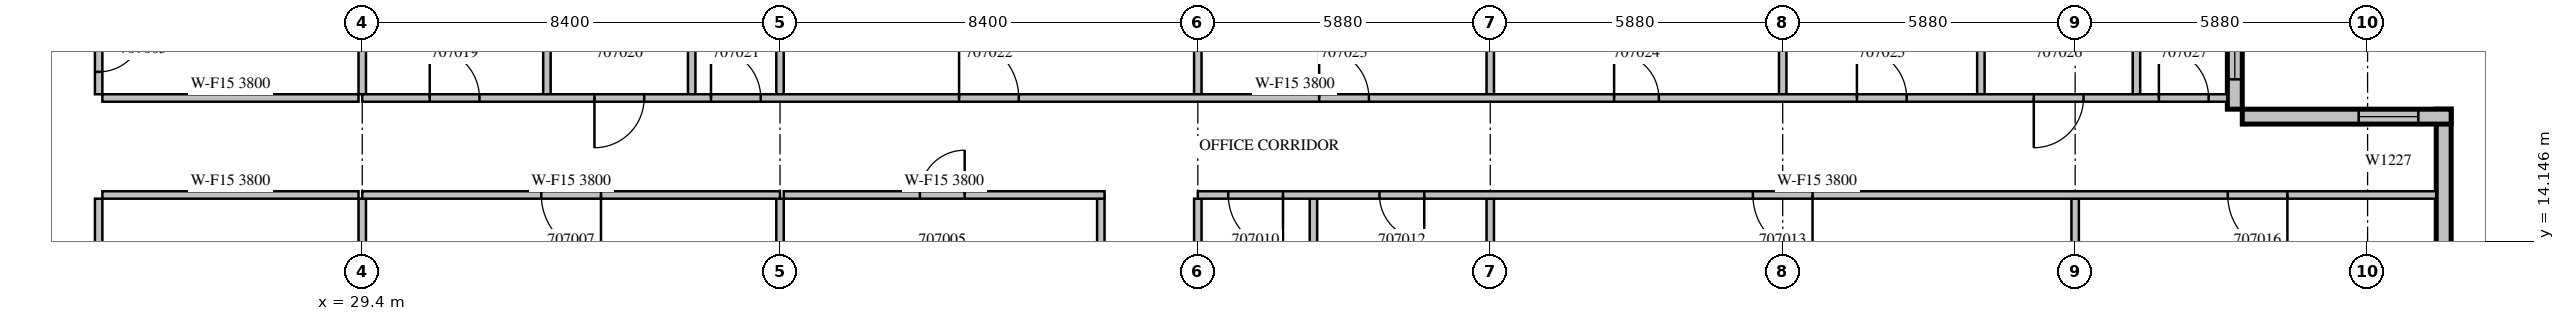
"""IFC4 building model, lengths in metres.
Left out: names, types, materials, properties, quantities, classifications, styles, units other than length and angle.
Written with IfcOpenShell. Run it as: python <this file> out.ifc"""

import sys

from ifc_helpers import new_model, si_unit, direction, frame, frame_2d, origin, place, context, subcontext, project, spatial, rectangle, extrude, source, transform, mapped, element, fill, save


model = new_model("IFC4")
c1 = context("Model", 3, precision=1e-05, world=origin(), true_north=direction((0.0, 1.0)))
c2 = subcontext(c1, "Body", "Model", "MODEL_VIEW")
j1 = project(units=[si_unit("LENGTHUNIT", "METRE"), si_unit("PLANEANGLEUNIT", "RADIAN")], contexts=[c1])
p1 = place(None, origin())
s1 = spatial("IfcSite", under=j1, at=p1, CompositionType="ELEMENT")
p2 = place(p1, origin())
s2 = spatial("IfcBuilding", under=s1, at=p2, CompositionType="ELEMENT")
p3 = place(p2, frame((0.0, 0.0, 40.5)))
s3 = spatial("IfcBuildingStorey", under=s2, at=p3, CompositionType="ELEMENT", Elevation=40.5)
p4 = place(p3, frame((71.25, 10.5, 0.0), z_axis=(0.0, 0.0, 1.0), x_axis=(0.0, 1.0, 0.0)))
e1 = element("IfcWall", 1, at=p4, inside=s3, PredefinedType="STANDARD", context=c2, shape_type="SweptSolid", body=[
    extrude(rectangle(XDim=6.3, YDim=0.3, at=frame_2d((3.15, 0.0))), origin(), (0.0, 0.0, 1.0), 3.8),
])
m1 = source(origin(), c2, "Body", "SweptSolid", [
    extrude(rectangle(XDim=1.2, YDim=2.7, at=frame_2d((0.6, 1.35))), frame((0.0, 0.16, 0.0), z_axis=(0.0, -1.0, 0.0), x_axis=(1.0, 0.0, 0.0)), (0.0, 0.0, 1.0), 0.32),
])
p5 = place(p4, frame((1.062, 0.0, 0.6)))
e2 = element("IfcOpeningElement", 2, at=p5, cuts=e1, PredefinedType="OPENING", context=c2, shape_type="MappedRepresentation", body=[
    mapped(m1, transform((0.0, 0.0, 0.0), scale=1.0)),
])
m2 = source(origin(), c2, "Body", "SweptSolid", [
    extrude(rectangle(XDim=4.2, YDim=0.3, at=frame_2d((2.1, 0.0))), origin(), (0.0, 0.0, 1.0), 3.8),
])
p6 = place(p3, frame((71.4, 16.65, 0.0), z_axis=(0.0, 0.0, 1.0), x_axis=(-1.0, 0.0, 0.0)))
e3 = element("IfcWall", 3, at=p6, inside=s3, PredefinedType="STANDARD", context=c2, shape_type="MappedRepresentation", body=[
    mapped(m2, transform((0.0, 0.0, 0.0), scale=1.0)),
])
p7 = place(p6, frame((0.66, 0.0, 0.6)))
e4 = element("IfcOpeningElement", 4, at=p7, cuts=e3, PredefinedType="OPENING", context=c2, shape_type="MappedRepresentation", body=[
    mapped(m1, transform((0.0, 0.0, 0.0), scale=1.0)),
])
p8 = place(p3, frame((67.05, 16.8, 0.0), z_axis=(0.0, 0.0, 1.0), x_axis=(0.0, 1.0, 0.0)))
e5 = element("IfcWall", 5, at=p8, inside=s3, PredefinedType="STANDARD", context=c2, shape_type="MappedRepresentation", body=[
    mapped(m2, transform((0.0, 0.0, 0.0), scale=1.0)),
])
m3 = source(origin(), c2, "Body", "SweptSolid", [
    extrude(rectangle(XDim=3.0, YDim=2.7, at=frame_2d((1.5, 1.35))), frame((0.0, 0.16, 0.0), z_axis=(0.0, -1.0, 0.0), x_axis=(1.0, 0.0, 0.0)), (0.0, 0.0, 1.0), 0.32),
])
p9 = place(p8, frame((0.6, 0.0, 0.6)))
e6 = element("IfcOpeningElement", 6, at=p9, cuts=e5, PredefinedType="OPENING", context=c2, shape_type="MappedRepresentation", body=[
    mapped(m3, transform((0.0, 0.0, 0.0), scale=1.0)),
])
p10 = place(p3, frame((24.1, 15.0, 0.0), z_axis=(0.0, 0.0, 1.0), x_axis=(0.0, -1.0, 0.0)))
e7 = element("IfcWall", 7, at=p10, inside=s3, PredefinedType="PARTITIONING", context=c2, shape_type="SweptSolid", body=[
    extrude(rectangle(XDim=11.925, YDim=0.15, at=frame_2d((5.963, 0.0))), origin(), (0.0, 0.0, 1.0), 3.8),
])
p11 = place(p10, frame((9.562, 0.0, 0.0)))
e8 = element("IfcOpeningElement", 8, at=p11, cuts=e7, PredefinedType="OPENING", context=c2, shape_type="SweptSolid", body=[
    extrude(rectangle(XDim=0.9, YDim=2.1, at=frame_2d((0.45, 1.05))), frame((0.0, 0.085, 0.0), z_axis=(0.0, -1.0, 0.0), x_axis=(1.0, 0.0, 0.0)), (0.0, 0.0, 1.0), 0.17),
])
m4 = source(origin(), c2, "Body", "SweptSolid", [
    extrude(rectangle(XDim=0.9, YDim=2.1, at=frame_2d((0.45, 1.05))), frame((0.0, 0.085, 0.0), z_axis=(0.0, -1.0, 0.0), x_axis=(1.0, 0.0, 0.0)), (0.0, 0.0, 1.0), 0.17),
])
p12 = place(p10, frame((2.725, 0.0, 0.0)))
e9 = element("IfcOpeningElement", 9, at=p12, cuts=e7, PredefinedType="OPENING", context=c2, shape_type="MappedRepresentation", body=[
    mapped(m4, transform((0.0, 0.0, 0.0), scale=1.0)),
])
p13 = place(p3, frame((24.1, 20.7, 0.0), z_axis=(0.0, 0.0, 1.0), x_axis=(0.0, -1.0, 0.0)))
e10 = element("IfcWall", 10, at=p13, inside=s3, PredefinedType="PARTITIONING", context=c2, shape_type="SweptSolid", body=[
    extrude(rectangle(XDim=3.6, YDim=0.15, at=frame_2d((1.8, 0.0))), origin(), (0.0, 0.0, 1.0), 3.8),
])
p14 = place(p13, frame((2.25, 0.0, 0.0)))
e11 = element("IfcOpeningElement", 11, at=p14, cuts=e10, PredefinedType="OPENING", context=c2, shape_type="MappedRepresentation", body=[
    mapped(m4, transform((0.0, 0.0, 0.0), scale=1.0)),
])
m5 = source(origin(), c2, "Body", "SweptSolid", [
    extrude(rectangle(XDim=5.15, YDim=0.15, at=frame_2d((2.575, 0.0))), origin(), (0.0, 0.0, 1.0), 3.8),
])
for number, where, z_axis, x_axis in (
    (12, (29.325, 15.075, 0.0), (0.0, 0.0, 1.0), (-1.0, 0.0, 0.0)),
    (13, (24.175, 17.025, 0.0), (0.0, 0.0, 1.0), (1.0, 0.0, 0.0)),
):
    element("IfcWall", number, at=place(p3, frame(where, z_axis=z_axis, x_axis=x_axis)), inside=s3, PredefinedType="PARTITIONING", context=c2, shape_type="MappedRepresentation", body=[
        mapped(m5, transform((0.0, 0.0, 0.0), scale=1.0)),
    ])
p15 = place(p3, frame((29.4, 11.099, 0.0), z_axis=(0.0, 0.0, 1.0), x_axis=(0.0, 1.0, 0.0)))
e14 = element("IfcWall", 14, at=p15, inside=s3, PredefinedType="PARTITIONING", context=c2, shape_type="SweptSolid", body=[
    extrude(rectangle(XDim=3.901, YDim=0.15, at=frame_2d((1.95, 0.0))), origin(), (0.0, 0.0, 1.0), 3.8),
])
p16 = place(p3, frame((29.4, 17.1, 0.0), z_axis=(0.0, 0.0, 1.0), x_axis=(0.0, 1.0, 0.0)))
e15 = element("IfcWall", 15, at=p16, inside=s3, PredefinedType="PARTITIONING", context=c2, shape_type="SweptSolid", body=[
    extrude(rectangle(XDim=2.701, YDim=0.15, at=frame_2d((1.351, 0.0))), origin(), (0.0, 0.0, 1.0), 3.8),
])
p17 = place(p3, frame((44.25, 11.1, 0.0), z_axis=(0.0, 0.0, 1.0), x_axis=(0.0, 1.0, 0.0)))
e16 = element("IfcWall", 16, at=p17, inside=s3, PredefinedType="PARTITIONING", context=c2, shape_type="SweptSolid", body=[
    extrude(rectangle(XDim=3.975, YDim=0.15, at=frame_2d((1.988, 0.0))), origin(), (0.0, 0.0, 1.0), 3.8),
])
m6 = source(origin(), c2, "Body", "SweptSolid", [
    extrude(rectangle(XDim=6.45, YDim=0.15, at=frame_2d((3.225, 0.0))), origin(), (0.0, 0.0, 1.0), 3.8),
])
p18 = place(p3, frame((44.325, 15.075, 0.0), z_axis=(0.0, 0.0, 1.0), x_axis=(-1.0, 0.0, 0.0)))
e17 = element("IfcWall", 17, at=p18, inside=s3, PredefinedType="PARTITIONING", context=c2, shape_type="MappedRepresentation", body=[
    mapped(m6, transform((0.0, 0.0, 0.0), scale=1.0)),
])
p19 = place(p18, frame((2.812, 0.0, 0.0)))
e18 = element("IfcOpeningElement", 18, at=p19, cuts=e17, PredefinedType="OPENING", context=c2, shape_type="MappedRepresentation", body=[
    mapped(m4, transform((0.0, 0.0, 0.0), scale=1.0)),
])
p20 = place(p3, frame((37.8, 11.25, 0.0), z_axis=(0.0, 0.0, 1.0), x_axis=(0.0, 1.0, 0.0)))
e19 = element("IfcWall", 19, at=p20, inside=s3, PredefinedType="PARTITIONING", context=c2, shape_type="SweptSolid", body=[
    extrude(rectangle(XDim=3.75, YDim=0.15, at=frame_2d((1.875, 0.0))), origin(), (0.0, 0.0, 1.0), 3.8),
])
m7 = source(origin(), c2, "Body", "SweptSolid", [
    extrude(rectangle(XDim=3.75, YDim=0.15, at=frame_2d((1.875, 0.0))), origin(), (0.0, 0.0, 1.0), 3.8),
])
for number, where, z_axis, x_axis in (
    (20, (48.525, 11.25, 0.0), (0.0, 0.0, 1.0), (0.0, 1.0, 0.0)),
    (21, (46.2, 11.25, 0.0), (0.0, 0.0, 1.0), (0.0, 1.0, 0.0)),
    (22, (52.08, 11.25, 0.0), (0.0, 0.0, 1.0), (0.0, 1.0, 0.0)),
    (23, (63.84, 11.25, 0.0), (0.0, 0.0, 1.0), (0.0, 1.0, 0.0)),
):
    element("IfcWall", number, at=place(p3, frame(where, z_axis=z_axis, x_axis=x_axis)), inside=s3, PredefinedType="PARTITIONING", context=c2, shape_type="MappedRepresentation", body=[
        mapped(m7, transform((0.0, 0.0, 0.0), scale=1.0)),
    ])
m8 = source(origin(), c2, "Body", "SweptSolid", [
    extrude(rectangle(XDim=3.6, YDim=0.15, at=frame_2d((1.8, 0.0))), origin(), (0.0, 0.0, 1.0), 3.8),
])
for number, where, z_axis, x_axis in (
    (24, (33.113, 20.7, 0.0), (0.0, 0.0, 1.0), (0.0, -1.0, 0.0)),
    (25, (36.024, 20.7, 0.0), (0.0, 0.0, 1.0), (0.0, -1.0, 0.0)),
    (26, (61.944, 20.7, 0.0), (0.0, 0.0, 1.0), (0.0, -1.0, 0.0)),
    (27, (65.072, 20.7, 0.0), (0.0, 0.0, 1.0), (0.0, -1.0, 0.0)),
):
    element("IfcWall", number, at=place(p3, frame(where, z_axis=z_axis, x_axis=x_axis)), inside=s3, PredefinedType="PARTITIONING", context=c2, shape_type="MappedRepresentation", body=[
        mapped(m8, transform((0.0, 0.0, 0.0), scale=1.0)),
    ])
m9 = source(origin(), c2, "Body", "SweptSolid", [
    extrude(rectangle(XDim=2.701, YDim=0.15, at=frame_2d((1.351, 0.0))), origin(), (0.0, 0.0, 1.0), 3.8),
])
for number, where, z_axis, x_axis in (
    (28, (37.8, 17.1, 0.0), (0.0, 0.0, 1.0), (0.0, 1.0, 0.0)),
    (29, (46.2, 17.1, 0.0), (0.0, 0.0, 1.0), (0.0, 1.0, 0.0)),
    (30, (52.08, 17.1, 0.0), (0.0, 0.0, 1.0), (0.0, 1.0, 0.0)),
    (31, (57.96, 17.1, 0.0), (0.0, 0.0, 1.0), (0.0, 1.0, 0.0)),
):
    element("IfcWall", number, at=place(p3, frame(where, z_axis=z_axis, x_axis=x_axis)), inside=s3, PredefinedType="PARTITIONING", context=c2, shape_type="MappedRepresentation", body=[
        mapped(m9, transform((0.0, 0.0, 0.0), scale=1.0)),
    ])
m10 = source(origin(), c2, "Body", "SweptSolid", [
    extrude(rectangle(XDim=8.4, YDim=0.15, at=frame_2d((4.2, 0.0))), origin(), (0.0, 0.0, 1.0), 3.8),
])
p21 = place(p3, frame((37.8, 15.075, 0.0), z_axis=(0.0, 0.0, 1.0), x_axis=(-1.0, 0.0, 0.0)))
e32 = element("IfcWall", 32, at=p21, inside=s3, PredefinedType="PARTITIONING", context=c2, shape_type="MappedRepresentation", body=[
    mapped(m10, transform((0.0, 0.0, 0.0), scale=1.0)),
])
p22 = place(p21, frame((3.6, 0.0, 0.0)))
e33 = element("IfcOpeningElement", 33, at=p22, cuts=e32, PredefinedType="OPENING", context=c2, shape_type="SweptSolid", body=[
    extrude(rectangle(XDim=1.2, YDim=2.1, at=frame_2d((0.6, 1.05))), frame((0.0, 0.085, 0.0), z_axis=(0.0, -1.0, 0.0), x_axis=(1.0, 0.0, 0.0)), (0.0, 0.0, 1.0), 0.17),
])
m11 = source(origin(), c2, "Body", "SweptSolid", [
    extrude(rectangle(XDim=24.9, YDim=0.15, at=frame_2d((12.45, 0.0))), origin(), (0.0, 0.0, 1.0), 3.8),
])
p23 = place(p3, frame((71.1, 15.075, 0.0), z_axis=(0.0, 0.0, 1.0), x_axis=(-1.0, 0.0, 0.0)))
e34 = element("IfcWall", 34, at=p23, inside=s3, PredefinedType="PARTITIONING", context=c2, shape_type="MappedRepresentation", body=[
    mapped(m11, transform((0.0, 0.0, 0.0), scale=1.0)),
])
p24 = place(p23, frame((23.188, 0.0, 0.0)))
e35 = element("IfcOpeningElement", 35, at=p24, cuts=e34, PredefinedType="OPENING", context=c2, shape_type="SweptSolid", body=[
    extrude(rectangle(XDim=1.1, YDim=2.1, at=frame_2d((0.55, 1.05))), frame((0.0, 0.085, 0.0), z_axis=(0.0, -1.0, 0.0), x_axis=(1.0, 0.0, 0.0)), (0.0, 0.0, 1.0), 0.17),
])
p25 = place(p23, frame((20.348, 0.0, 0.0)))
e36 = element("IfcOpeningElement", 36, at=p25, cuts=e34, PredefinedType="OPENING", context=c2, shape_type="MappedRepresentation", body=[
    mapped(m4, transform((0.0, 0.0, 0.0), scale=1.0)),
])
m12 = source(origin(), c2, "Body", "SweptSolid", [
    extrude(rectangle(XDim=1.2, YDim=2.1, at=frame_2d((0.6, 1.05))), frame((0.0, 0.085, 0.0), z_axis=(0.0, -1.0, 0.0), x_axis=(1.0, 0.0, 0.0)), (0.0, 0.0, 1.0), 0.17),
])
p26 = place(p23, frame((12.54, 0.0, 0.0)))
e37 = element("IfcOpeningElement", 37, at=p26, cuts=e34, PredefinedType="OPENING", context=c2, shape_type="MappedRepresentation", body=[
    mapped(m12, transform((0.0, 0.0, 0.0), scale=1.0)),
])
p27 = place(p23, frame((2.993, 0.0, 0.0)))
e38 = element("IfcOpeningElement", 38, at=p27, cuts=e34, PredefinedType="OPENING", context=c2, shape_type="MappedRepresentation", body=[
    mapped(m12, transform((0.0, 0.0, 0.0), scale=1.0)),
])
p28 = place(p3, frame((29.4, 17.025, 0.0), z_axis=(0.0, 0.0, 1.0), x_axis=(1.0, 0.0, 0.0)))
e39 = element("IfcWall", 39, at=p28, inside=s3, PredefinedType="PARTITIONING", context=c2, shape_type="SweptSolid", body=[
    extrude(rectangle(XDim=37.5, YDim=0.15, at=frame_2d((18.75, 0.0))), origin(), (0.0, 0.0, 1.0), 3.8),
])
m13 = source(origin(), c2, "Body", "SweptSolid", [
    extrude(rectangle(XDim=1.0, YDim=2.1, at=frame_2d((0.5, 1.05))), frame((0.0, 0.085, 0.0), z_axis=(0.0, -1.0, 0.0), x_axis=(1.0, 0.0, 0.0)), (0.0, 0.0, 1.0), 0.17),
])
p29 = place(p28, frame((1.357, 0.0, 0.0)))
e40 = element("IfcOpeningElement", 40, at=p29, cuts=e39, PredefinedType="OPENING", context=c2, shape_type="MappedRepresentation", body=[
    mapped(m13, transform((0.0, 0.0, 0.0), scale=1.0)),
])
p30 = place(p28, frame((4.669, 0.0, 0.0)))
e41 = element("IfcOpeningElement", 41, at=p30, cuts=e39, PredefinedType="OPENING", context=c2, shape_type="MappedRepresentation", body=[
    mapped(m13, transform((0.0, 0.0, 0.0), scale=1.0)),
])
p31 = place(p28, frame((7.012, 0.0, 0.0)))
e42 = element("IfcOpeningElement", 42, at=p31, cuts=e39, PredefinedType="OPENING", context=c2, shape_type="MappedRepresentation", body=[
    mapped(m13, transform((0.0, 0.0, 0.0), scale=1.0)),
])
p32 = place(p28, frame((12.0, 0.0, 0.0)))
e43 = element("IfcOpeningElement", 43, at=p32, cuts=e39, PredefinedType="OPENING", context=c2, shape_type="MappedRepresentation", body=[
    mapped(m12, transform((0.0, 0.0, 0.0), scale=1.0)),
])
p33 = place(p28, frame((19.24, 0.0, 0.0)))
e44 = element("IfcOpeningElement", 44, at=p33, cuts=e39, PredefinedType="OPENING", context=c2, shape_type="MappedRepresentation", body=[
    mapped(m13, transform((0.0, 0.0, 0.0), scale=1.0)),
])
p34 = place(p28, frame((25.17, 0.0, 0.0)))
e45 = element("IfcOpeningElement", 45, at=p34, cuts=e39, PredefinedType="OPENING", context=c2, shape_type="MappedRepresentation", body=[
    mapped(m4, transform((0.0, 0.0, 0.0), scale=1.0)),
])
p35 = place(p28, frame((30.052, 0.0, 0.0)))
e46 = element("IfcOpeningElement", 46, at=p35, cuts=e39, PredefinedType="OPENING", context=c2, shape_type="MappedRepresentation", body=[
    mapped(m13, transform((0.0, 0.0, 0.0), scale=1.0)),
])
p36 = place(p28, frame((33.608, 0.0, 0.0)))
e47 = element("IfcOpeningElement", 47, at=p36, cuts=e39, PredefinedType="OPENING", context=c2, shape_type="MappedRepresentation", body=[
    mapped(m13, transform((0.0, 0.0, 0.0), scale=1.0)),
])
p37 = place(p28, frame((36.124, 0.0, 0.0)))
e48 = element("IfcOpeningElement", 48, at=p37, cuts=e39, PredefinedType="OPENING", context=c2, shape_type="MappedRepresentation", body=[
    mapped(m13, transform((0.0, 0.0, 0.0), scale=1.0)),
])
m14 = source(origin(), c2, "Body", "SweptSolid", [
    extrude(rectangle(XDim=1.2, YDim=2.7, at=frame_2d((0.6, 1.35))), frame((0.0, 0.03, 0.0), z_axis=(0.0, -1.0, 0.0), x_axis=(1.0, 0.0, 0.0)), (0.0, 0.0, 1.0), 0.06),
])
p38 = place(p7, origin())
e49 = element("IfcWindow", 49, at=p38, inside=s3, PartitioningType="SINGLE_PANEL", PredefinedType="WINDOW", context=c2, shape_type="MappedRepresentation", body=[
    mapped(m14, transform((0.0, 0.0, 0.0), scale=1.0)),
])
fill(e4, e49)
m15 = source(origin(), c2, "Body", "SweptSolid", [
    extrude(rectangle(XDim=3.0, YDim=2.7, at=frame_2d((1.5, 1.35))), frame((0.0, 0.03, 0.0), z_axis=(0.0, -1.0, 0.0), x_axis=(1.0, 0.0, 0.0)), (0.0, 0.0, 1.0), 0.06),
])
p39 = place(p9, origin())
e50 = element("IfcWindow", 50, at=p39, inside=s3, PartitioningType="SINGLE_PANEL", PredefinedType="WINDOW", context=c2, shape_type="MappedRepresentation", body=[
    mapped(m15, transform((0.0, 0.0, 0.0), scale=1.0)),
])
fill(e6, e50)
m16 = source(origin(), c2, "Body", "SweptSolid", [
    extrude(rectangle(XDim=0.9, YDim=2.1, at=frame_2d((0.45, 1.05))), frame((0.0, 0.025, 0.0), z_axis=(0.0, -1.0, 0.0), x_axis=(1.0, 0.0, 0.0)), (0.0, 0.0, 1.0), 0.05),
])
p40 = place(p14, origin())
e51 = element("IfcDoor", 51, at=p40, inside=s3, OperationType="SINGLE_SWING_LEFT", PredefinedType="DOOR", context=c2, shape_type="MappedRepresentation", body=[
    mapped(m16, transform((0.0, 0.0, 0.0), scale=1.0)),
])
fill(e11, e51)
p41 = place(p19, origin())
e52 = element("IfcDoor", 52, at=p41, inside=s3, OperationType="SINGLE_SWING_RIGHT", PredefinedType="DOOR", context=c2, shape_type="MappedRepresentation", body=[
    mapped(m16, transform((0.0, 0.0, 0.0), scale=1.0)),
])
fill(e18, e52)
m17 = source(origin(), c2, "Body", "SweptSolid", [
    extrude(rectangle(XDim=1.2, YDim=2.1, at=frame_2d((0.6, 1.05))), frame((0.0, 0.025, 0.0), z_axis=(0.0, -1.0, 0.0), x_axis=(1.0, 0.0, 0.0)), (0.0, 0.0, 1.0), 0.05),
])
p42 = place(p22, origin())
e53 = element("IfcDoor", 53, at=p42, inside=s3, OperationType="SINGLE_SWING_LEFT", PredefinedType="DOOR", context=c2, shape_type="MappedRepresentation", body=[
    mapped(m17, transform((0.0, 0.0, 0.0), scale=1.0)),
])
fill(e33, e53)
m18 = source(origin(), c2, "Body", "SweptSolid", [
    extrude(rectangle(XDim=1.1, YDim=2.1, at=frame_2d((0.55, 1.05))), frame((0.0, 0.025, 0.0), z_axis=(0.0, -1.0, 0.0), x_axis=(1.0, 0.0, 0.0)), (0.0, 0.0, 1.0), 0.05),
])
p43 = place(p24, origin())
e54 = element("IfcDoor", 54, at=p43, inside=s3, OperationType="SINGLE_SWING_LEFT", PredefinedType="DOOR", context=c2, shape_type="MappedRepresentation", body=[
    mapped(m18, transform((0.0, 0.0, 0.0), scale=1.0)),
])
fill(e35, e54)
p44 = place(p25, origin())
e55 = element("IfcDoor", 55, at=p44, inside=s3, OperationType="SINGLE_SWING_LEFT", PredefinedType="DOOR", context=c2, shape_type="MappedRepresentation", body=[
    mapped(m16, transform((0.0, 0.0, 0.0), scale=1.0)),
])
fill(e36, e55)
p45 = place(p26, origin())
e56 = element("IfcDoor", 56, at=p45, inside=s3, OperationType="SINGLE_SWING_LEFT", PredefinedType="DOOR", context=c2, shape_type="MappedRepresentation", body=[
    mapped(m17, transform((0.0, 0.0, 0.0), scale=1.0)),
])
fill(e37, e56)
p46 = place(p27, origin())
e57 = element("IfcDoor", 57, at=p46, inside=s3, OperationType="SINGLE_SWING_LEFT", PredefinedType="DOOR", context=c2, shape_type="MappedRepresentation", body=[
    mapped(m17, transform((0.0, 0.0, 0.0), scale=1.0)),
])
fill(e38, e57)
m19 = source(origin(), c2, "Body", "SweptSolid", [
    extrude(rectangle(XDim=1.0, YDim=2.1, at=frame_2d((0.5, 1.05))), frame((0.0, 0.025, 0.0), z_axis=(0.0, -1.0, 0.0), x_axis=(1.0, 0.0, 0.0)), (0.0, 0.0, 1.0), 0.05),
])
p47 = place(p29, origin())
e58 = element("IfcDoor", 58, at=p47, inside=s3, OperationType="SINGLE_SWING_LEFT", PredefinedType="DOOR", context=c2, shape_type="MappedRepresentation", body=[
    mapped(m19, transform((0.0, 0.0, 0.0), scale=1.0)),
])
fill(e40, e58)
p48 = place(p30, origin())
e59 = element("IfcDoor", 59, at=p48, inside=s3, OperationType="SINGLE_SWING_RIGHT", PredefinedType="DOOR", context=c2, shape_type="MappedRepresentation", body=[
    mapped(m19, transform((0.0, 0.0, 0.0), scale=1.0)),
])
fill(e41, e59)
p49 = place(p31, origin())
e60 = element("IfcDoor", 60, at=p49, inside=s3, OperationType="SINGLE_SWING_LEFT", PredefinedType="DOOR", context=c2, shape_type="MappedRepresentation", body=[
    mapped(m19, transform((0.0, 0.0, 0.0), scale=1.0)),
])
fill(e42, e60)
p50 = place(p32, origin())
e61 = element("IfcDoor", 61, at=p50, inside=s3, OperationType="SINGLE_SWING_LEFT", PredefinedType="DOOR", context=c2, shape_type="MappedRepresentation", body=[
    mapped(m17, transform((0.0, 0.0, 0.0), scale=1.0)),
])
fill(e43, e61)
p51 = place(p33, origin())
e62 = element("IfcDoor", 62, at=p51, inside=s3, OperationType="SINGLE_SWING_LEFT", PredefinedType="DOOR", context=c2, shape_type="MappedRepresentation", body=[
    mapped(m19, transform((0.0, 0.0, 0.0), scale=1.0)),
])
fill(e44, e62)
p52 = place(p34, origin())
e63 = element("IfcDoor", 63, at=p52, inside=s3, OperationType="SINGLE_SWING_LEFT", PredefinedType="DOOR", context=c2, shape_type="MappedRepresentation", body=[
    mapped(m16, transform((0.0, 0.0, 0.0), scale=1.0)),
])
fill(e45, e63)
p53 = place(p35, origin())
e64 = element("IfcDoor", 64, at=p53, inside=s3, OperationType="SINGLE_SWING_LEFT", PredefinedType="DOOR", context=c2, shape_type="MappedRepresentation", body=[
    mapped(m19, transform((0.0, 0.0, 0.0), scale=1.0)),
])
fill(e46, e64)
p54 = place(p36, origin())
e65 = element("IfcDoor", 65, at=p54, inside=s3, OperationType="SINGLE_SWING_RIGHT", PredefinedType="DOOR", context=c2, shape_type="MappedRepresentation", body=[
    mapped(m19, transform((0.0, 0.0, 0.0), scale=1.0)),
])
fill(e47, e65)
p55 = place(p37, origin())
e66 = element("IfcDoor", 66, at=p55, inside=s3, OperationType="SINGLE_SWING_LEFT", PredefinedType="DOOR", context=c2, shape_type="MappedRepresentation", body=[
    mapped(m19, transform((0.0, 0.0, 0.0), scale=1.0)),
])
fill(e48, e66)
save(model, sys.argv[1])
